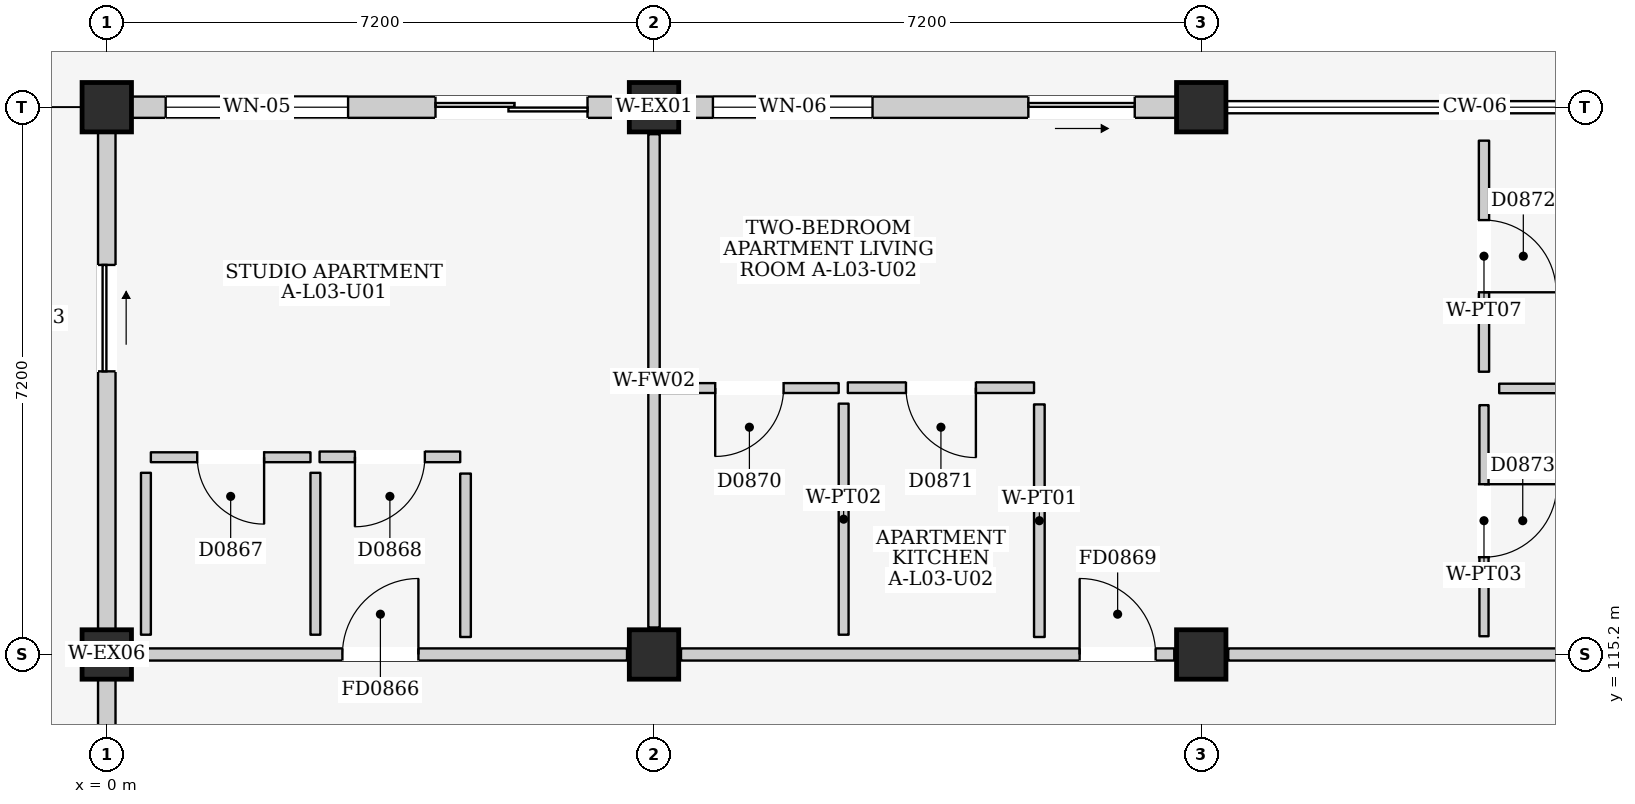
"""IFC4 building model, lengths in metres.
Left out: names, types, materials, properties, quantities, classifications, styles, units other than length and angle.
Written with IfcOpenShell. Run it as: python <this file> out.ifc"""

import sys

from ifc_helpers import new_model, si_unit, direction, frame, frame_2d, origin, origin_2d, place, context, subcontext, project, spatial, rectangle, extrude, element, fill, save


model = new_model("IFC4")
c1 = context("Model", 3, precision=1e-05, world=origin(), true_north=direction((0.0, 1.0)))
c2 = subcontext(c1, "Body", "Model", "MODEL_VIEW")
j1 = project(units=[si_unit("LENGTHUNIT", "METRE"), si_unit("PLANEANGLEUNIT", "RADIAN")], contexts=[c1])
p1 = place(None, origin())
s1 = spatial("IfcSite", under=j1, at=p1, CompositionType="ELEMENT")
p2 = place(p1, origin())
s2 = spatial("IfcBuilding", under=s1, at=p2, CompositionType="ELEMENT")
p3 = place(p2, frame((0.0, 0.0, 12.2)))
s3 = spatial("IfcBuildingStorey", under=s2, at=p3, CompositionType="ELEMENT", Elevation=12.2)
for number, where, z_axis, x_axis in (
    (1, (0.0, 115.2, 0.0), (0.0, 0.0, 1.0), (1.0, 0.0, 0.0)),
    (2, (0.0, 122.4, 0.0), (0.0, 0.0, 1.0), (1.0, 0.0, 0.0)),
    (3, (7.2, 115.2, 0.0), (0.0, 0.0, 1.0), (1.0, 0.0, 0.0)),
    (4, (7.2, 122.4, 0.0), (0.0, 0.0, 1.0), (1.0, 0.0, 0.0)),
    (5, (14.4, 115.2, 0.0), (0.0, 0.0, 1.0), (1.0, 0.0, 0.0)),
    (6, (14.4, 122.4, 0.0), (0.0, 0.0, 1.0), (1.0, 0.0, 0.0)),
):
    element("IfcColumn", number, at=place(p3, frame(where, z_axis=z_axis, x_axis=x_axis)), inside=s3, PredefinedType="COLUMN", context=c2, shape_type="SweptSolid", body=[
        extrude(rectangle(XDim=0.65, YDim=0.65, at=origin_2d()), origin(), (0.0, 0.0, 1.0), 3.2),
    ])
p4 = place(p3, frame((0.325, 122.4, 0.0), z_axis=(0.0, 0.0, 1.0), x_axis=(1.0, 0.0, 0.0)))
e7 = element("IfcWall", 7, at=p4, inside=s3, PredefinedType="ELEMENTEDWALL", context=c2, shape_type="SweptSolid", body=[
    extrude(rectangle(XDim=6.55, YDim=0.28, at=frame_2d((3.275, 0.0))), origin(), (0.0, 0.0, 1.0), 2.445),
])
p5 = place(p4, frame((4.0, 0.0, 0.0)))
e8 = element("IfcOpeningElement", 8, at=p5, cuts=e7, PredefinedType="OPENING", context=c2, shape_type="SweptSolid", body=[
    extrude(rectangle(XDim=2.0, YDim=2.12, at=frame_2d((1.0, 1.06))), frame((0.0, 0.155, 0.0), z_axis=(0.0, -1.0, 0.0), x_axis=(1.0, 0.0, 0.0)), (0.0, 0.0, 1.0), 0.31),
])
p6 = place(p4, frame((0.45, 0.0, 0.685)))
e9 = element("IfcOpeningElement", 9, at=p6, cuts=e7, PredefinedType="OPENING", context=c2, shape_type="SweptSolid", body=[
    extrude(rectangle(XDim=2.4, YDim=1.65, at=frame_2d((1.2, 0.825))), frame((0.0, 0.155, 0.0), z_axis=(0.0, -1.0, 0.0), x_axis=(1.0, 0.0, 0.0)), (0.0, 0.0, 1.0), 0.31),
])
p7 = place(p3, frame((7.525, 122.4, 0.0), z_axis=(0.0, 0.0, 1.0), x_axis=(1.0, 0.0, 0.0)))
e10 = element("IfcWall", 10, at=p7, inside=s3, PredefinedType="ELEMENTEDWALL", context=c2, shape_type="SweptSolid", body=[
    extrude(rectangle(XDim=6.55, YDim=0.28, at=frame_2d((3.275, 0.0))), origin(), (0.0, 0.0, 1.0), 2.445),
])
p8 = place(p7, frame((4.6, 0.0, 0.0)))
e11 = element("IfcOpeningElement", 11, at=p8, cuts=e10, PredefinedType="OPENING", context=c2, shape_type="SweptSolid", body=[
    extrude(rectangle(XDim=1.4, YDim=2.1, at=frame_2d((0.7, 1.05))), frame((0.0, 0.155, 0.0), z_axis=(0.0, -1.0, 0.0), x_axis=(1.0, 0.0, 0.0)), (0.0, 0.0, 1.0), 0.31),
])
p9 = place(p7, frame((0.45, 0.0, 0.685)))
e12 = element("IfcOpeningElement", 12, at=p9, cuts=e10, PredefinedType="OPENING", context=c2, shape_type="SweptSolid", body=[
    extrude(rectangle(XDim=2.1, YDim=1.65, at=frame_2d((1.05, 0.825))), frame((0.0, 0.155, 0.0), z_axis=(0.0, -1.0, 0.0), x_axis=(1.0, 0.0, 0.0)), (0.0, 0.0, 1.0), 0.31),
])
p10 = place(p3, frame((0.0, 108.325, 0.0), z_axis=(0.0, 0.0, 1.0), x_axis=(0.0, 1.0, 0.0)))
e13 = element("IfcWall", 13, at=p10, inside=s3, PredefinedType="ELEMENTEDWALL", context=c2, shape_type="SweptSolid", body=[
    extrude(rectangle(XDim=6.55, YDim=0.23, at=frame_2d((3.275, 0.0))), origin(), (0.0, 0.0, 1.0), 2.445),
])
p11 = place(p10, frame((2.75, 0.0, 1.1)))
e14 = element("IfcOpeningElement", 14, at=p11, cuts=e13, PredefinedType="OPENING", context=c2, shape_type="SweptSolid", body=[
    extrude(rectangle(XDim=1.0, YDim=0.9, at=frame_2d((0.5, 0.45))), frame((0.0, 0.13, 0.0), z_axis=(0.0, -1.0, 0.0), x_axis=(1.0, 0.0, 0.0)), (0.0, 0.0, 1.0), 0.26),
])
p12 = place(p3, frame((0.0, 115.525, 0.0), z_axis=(0.0, 0.0, 1.0), x_axis=(0.0, 1.0, 0.0)))
e15 = element("IfcWall", 15, at=p12, inside=s3, PredefinedType="ELEMENTEDWALL", context=c2, shape_type="SweptSolid", body=[
    extrude(rectangle(XDim=6.55, YDim=0.23, at=frame_2d((3.275, 0.0))), origin(), (0.0, 0.0, 1.0), 2.445),
])
p13 = place(p12, frame((3.4, 0.0, 0.0)))
e16 = element("IfcOpeningElement", 16, at=p13, cuts=e15, PredefinedType="OPENING", context=c2, shape_type="SweptSolid", body=[
    extrude(rectangle(XDim=1.4, YDim=2.1, at=frame_2d((0.7, 1.05))), frame((0.0, 0.13, 0.0), z_axis=(0.0, -1.0, 0.0), x_axis=(1.0, 0.0, 0.0)), (0.0, 0.0, 1.0), 0.26),
])
p14 = place(p3, frame((0.355, 115.2, 0.0), z_axis=(0.0, 0.0, 1.0), x_axis=(1.0, 0.0, 0.0)))
e17 = element("IfcWall", 17, at=p14, inside=s3, PredefinedType="PARTITIONING", context=c2, shape_type="SweptSolid", body=[
    extrude(rectangle(XDim=6.49, YDim=0.16, at=frame_2d((3.245, 0.0))), origin(), (0.0, 0.0, 1.0), 2.315),
])
p15 = place(p14, frame((2.745, 0.0, 0.0)))
e18 = element("IfcOpeningElement", 18, at=p15, cuts=e17, PredefinedType="OPENING", context=c2, shape_type="SweptSolid", body=[
    extrude(rectangle(XDim=1.0, YDim=2.15, at=frame_2d((0.5, 1.075))), frame((0.0, 0.095, 0.0), z_axis=(0.0, -1.0, 0.0), x_axis=(1.0, 0.0, 0.0)), (0.0, 0.0, 1.0), 0.19),
])
p16 = place(p3, frame((7.2, 115.555, 0.0), z_axis=(0.0, 0.0, 1.0), x_axis=(0.0, 1.0, 0.0)))
e19 = element("IfcWall", 19, at=p16, inside=s3, PredefinedType="PARTITIONING", context=c2, shape_type="SweptSolid", body=[
    extrude(rectangle(XDim=6.49, YDim=0.15, at=frame_2d((3.245, 0.0))), origin(), (0.0, 0.0, 1.0), 2.415),
])
p17 = place(p3, frame((0.58, 117.795, 0.0), z_axis=(0.0, 0.0, 1.0), x_axis=(1.0, 0.0, 0.0)))
e20 = element("IfcWall", 20, at=p17, inside=s3, PredefinedType="PARTITIONING", context=c2, shape_type="SweptSolid", body=[
    extrude(rectangle(XDim=2.1, YDim=0.13, at=frame_2d((1.05, 0.0))), origin(), (0.0, 0.0, 1.0), 2.98),
])
p18 = place(p17, frame((0.61, 0.0, 0.0)))
e21 = element("IfcOpeningElement", 21, at=p18, cuts=e20, PredefinedType="OPENING", context=c2, shape_type="SweptSolid", body=[
    extrude(rectangle(XDim=0.88, YDim=2.1, at=frame_2d((0.44, 1.05))), frame((0.0, 0.08, 0.0), z_axis=(0.0, -1.0, 0.0), x_axis=(1.0, 0.0, 0.0)), (0.0, 0.0, 1.0), 0.16),
])
for number, where, z_axis, x_axis in (
    (22, (2.745, 115.46, 0.0), (0.0, 0.0, 1.0), (0.0, 1.0, 0.0)),
    (23, (0.515, 115.46, 0.0), (0.0, 0.0, 1.0), (0.0, 1.0, 0.0)),
):
    element("IfcWall", number, at=place(p3, frame(where, z_axis=z_axis, x_axis=x_axis)), inside=s3, PredefinedType="PARTITIONING", context=c2, shape_type="SweptSolid", body=[
        extrude(rectangle(XDim=2.13, YDim=0.13, at=frame_2d((1.065, 0.0))), origin(), (0.0, 0.0, 1.0), 2.98),
    ])
p19 = place(p3, frame((2.8, 117.8, 0.0), z_axis=(0.0, 0.0, 1.0), x_axis=(1.0, 0.0, 0.0)))
e24 = element("IfcWall", 24, at=p19, inside=s3, PredefinedType="PARTITIONING", context=c2, shape_type="SweptSolid", body=[
    extrude(rectangle(XDim=1.85, YDim=0.14, at=frame_2d((0.925, 0.0))), origin(), (0.0, 0.0, 1.0), 2.98),
])
p20 = place(p19, frame((0.465, 0.0, 0.0)))
e25 = element("IfcOpeningElement", 25, at=p20, cuts=e24, PredefinedType="OPENING", context=c2, shape_type="SweptSolid", body=[
    extrude(rectangle(XDim=0.92, YDim=2.1, at=frame_2d((0.46, 1.05))), frame((0.0, 0.085, 0.0), z_axis=(0.0, -1.0, 0.0), x_axis=(1.0, 0.0, 0.0)), (0.0, 0.0, 1.0), 0.17),
])
p21 = place(p3, frame((4.72, 115.43, 0.0), z_axis=(0.0, 0.0, 1.0), x_axis=(0.0, 1.0, 0.0)))
e26 = element("IfcWall", 26, at=p21, inside=s3, PredefinedType="PARTITIONING", context=c2, shape_type="SweptSolid", body=[
    extrude(rectangle(XDim=2.15, YDim=0.14, at=frame_2d((1.075, 0.0))), origin(), (0.0, 0.0, 1.0), 2.98),
])
p22 = place(p3, frame((7.555, 115.2, 0.0), z_axis=(0.0, 0.0, 1.0), x_axis=(1.0, 0.0, 0.0)))
e27 = element("IfcWall", 27, at=p22, inside=s3, PredefinedType="PARTITIONING", context=c2, shape_type="SweptSolid", body=[
    extrude(rectangle(XDim=6.49, YDim=0.16, at=frame_2d((3.245, 0.0))), origin(), (0.0, 0.0, 1.0), 2.315),
])
p23 = place(p22, frame((5.245, 0.0, 0.0)))
e28 = element("IfcOpeningElement", 28, at=p23, cuts=e27, PredefinedType="OPENING", context=c2, shape_type="SweptSolid", body=[
    extrude(rectangle(XDim=1.0, YDim=2.15, at=frame_2d((0.5, 1.075))), frame((0.0, 0.095, 0.0), z_axis=(0.0, -1.0, 0.0), x_axis=(1.0, 0.0, 0.0)), (0.0, 0.0, 1.0), 0.19),
])
p24 = place(p3, frame((14.755, 115.2, 0.0), z_axis=(0.0, 0.0, 1.0), x_axis=(1.0, 0.0, 0.0)))
e29 = element("IfcWall", 29, at=p24, inside=s3, PredefinedType="PARTITIONING", context=c2, shape_type="SweptSolid", body=[
    extrude(rectangle(XDim=6.49, YDim=0.16, at=frame_2d((3.245, 0.0))), origin(), (0.0, 0.0, 1.0), 2.315),
])
p25 = place(p3, frame((7.28, 118.705, 0.0), z_axis=(0.0, 0.0, 1.0), x_axis=(1.0, 0.0, 0.0)))
e30 = element("IfcWall", 30, at=p25, inside=s3, PredefinedType="PARTITIONING", context=c2, shape_type="SweptSolid", body=[
    extrude(rectangle(XDim=2.35, YDim=0.13, at=frame_2d((1.175, 0.0))), origin(), (0.0, 0.0, 1.0), 2.98),
])
p26 = place(p25, frame((0.725, 0.0, 0.0)))
e31 = element("IfcOpeningElement", 31, at=p26, cuts=e30, PredefinedType="OPENING", context=c2, shape_type="SweptSolid", body=[
    extrude(rectangle(XDim=0.9, YDim=2.1, at=frame_2d((0.45, 1.05))), frame((0.0, 0.08, 0.0), z_axis=(0.0, -1.0, 0.0), x_axis=(1.0, 0.0, 0.0)), (0.0, 0.0, 1.0), 0.16),
])
p27 = place(p3, frame((9.695, 115.46, 0.0), z_axis=(0.0, 0.0, 1.0), x_axis=(0.0, 1.0, 0.0)))
e32 = element("IfcWall", 32, at=p27, inside=s3, PredefinedType="PARTITIONING", context=c2, shape_type="SweptSolid", body=[
    extrude(rectangle(XDim=3.04, YDim=0.13, at=frame_2d((1.52, 0.0))), origin(), (0.0, 0.0, 1.0), 2.98),
])
p28 = place(p3, frame((9.75, 118.71, 0.0), z_axis=(0.0, 0.0, 1.0), x_axis=(1.0, 0.0, 0.0)))
e33 = element("IfcWall", 33, at=p28, inside=s3, PredefinedType="PARTITIONING", context=c2, shape_type="SweptSolid", body=[
    extrude(rectangle(XDim=2.45, YDim=0.14, at=frame_2d((1.225, 0.0))), origin(), (0.0, 0.0, 1.0), 2.98),
])
p29 = place(p28, frame((0.765, 0.0, 0.0)))
e34 = element("IfcOpeningElement", 34, at=p29, cuts=e33, PredefinedType="OPENING", context=c2, shape_type="SweptSolid", body=[
    extrude(rectangle(XDim=0.92, YDim=2.1, at=frame_2d((0.46, 1.05))), frame((0.0, 0.085, 0.0), z_axis=(0.0, -1.0, 0.0), x_axis=(1.0, 0.0, 0.0)), (0.0, 0.0, 1.0), 0.17),
])
p30 = place(p3, frame((12.27, 115.43, 0.0), z_axis=(0.0, 0.0, 1.0), x_axis=(0.0, 1.0, 0.0)))
e35 = element("IfcWall", 35, at=p30, inside=s3, PredefinedType="PARTITIONING", context=c2, shape_type="SweptSolid", body=[
    extrude(rectangle(XDim=3.06, YDim=0.14, at=frame_2d((1.53, 0.0))), origin(), (0.0, 0.0, 1.0), 2.98),
])
p31 = place(p3, frame((18.12, 118.92, 0.0), z_axis=(0.0, 0.0, 1.0), x_axis=(0.0, 1.0, 0.0)))
e36 = element("IfcWall", 36, at=p31, inside=s3, PredefinedType="PARTITIONING", context=c2, shape_type="SweptSolid", body=[
    extrude(rectangle(XDim=3.04, YDim=0.135, at=frame_2d((1.52, 0.0))), origin(), (0.0, 0.0, 1.0), 2.98),
])
p32 = place(p31, frame((1.045, 0.0, 0.0)))
e37 = element("IfcOpeningElement", 37, at=p32, cuts=e36, PredefinedType="OPENING", context=c2, shape_type="SweptSolid", body=[
    extrude(rectangle(XDim=0.95, YDim=2.15, at=frame_2d((0.475, 1.075))), frame((0.0, 0.083, 0.0), z_axis=(0.0, -1.0, 0.0), x_axis=(1.0, 0.0, 0.0)), (0.0, 0.0, 1.0), 0.165),
])
p33 = place(p3, frame((18.32, 118.7, 0.0), z_axis=(0.0, 0.0, 1.0), x_axis=(1.0, 0.0, 0.0)))
e38 = element("IfcWall", 38, at=p33, inside=s3, PredefinedType="PARTITIONING", context=c2, shape_type="SweptSolid", body=[
    extrude(rectangle(XDim=3.06, YDim=0.125, at=frame_2d((1.53, 0.0))), origin(), (0.0, 0.0, 1.0), 2.98),
])
p34 = place(p3, frame((18.12, 115.44, 0.0), z_axis=(0.0, 0.0, 1.0), x_axis=(0.0, 1.0, 0.0)))
e39 = element("IfcWall", 39, at=p34, inside=s3, PredefinedType="PARTITIONING", context=c2, shape_type="SweptSolid", body=[
    extrude(rectangle(XDim=3.04, YDim=0.12, at=frame_2d((1.52, 0.0))), origin(), (0.0, 0.0, 1.0), 2.98),
])
p35 = place(p34, frame((1.04, 0.0, 0.0)))
e40 = element("IfcOpeningElement", 40, at=p35, cuts=e39, PredefinedType="OPENING", context=c2, shape_type="SweptSolid", body=[
    extrude(rectangle(XDim=0.96, YDim=2.15, at=frame_2d((0.48, 1.075))), frame((0.0, 0.075, 0.0), z_axis=(0.0, -1.0, 0.0), x_axis=(1.0, 0.0, 0.0)), (0.0, 0.0, 1.0), 0.15),
])
p36 = place(p5, frame((2.0, 0.0, 0.0), z_axis=(0.0, 0.0, 1.0), x_axis=(-1.0, 0.0, 0.0)))
e41 = element("IfcDoor", 41, at=p36, inside=s3, OperationType="DOUBLE_DOOR_SLIDING", PredefinedType="DOOR", context=c2, shape_type="SweptSolid", body=[
    extrude(rectangle(XDim=2.0, YDim=2.12, at=frame_2d((1.0, 1.06))), frame((0.0, 0.025, 0.0), z_axis=(0.0, -1.0, 0.0), x_axis=(1.0, 0.0, 0.0)), (0.0, 0.0, 1.0), 0.05),
])
fill(e8, e41)
p37 = place(p6, origin())
e42 = element("IfcWindow", 42, at=p37, inside=s3, PartitioningType="TRIPLE_PANEL_VERTICAL", PredefinedType="WINDOW", context=c2, shape_type="SweptSolid", body=[
    extrude(rectangle(XDim=2.4, YDim=1.65, at=frame_2d((1.2, 0.825))), frame((0.0, 0.03, 0.0), z_axis=(0.0, -1.0, 0.0), x_axis=(1.0, 0.0, 0.0)), (0.0, 0.0, 1.0), 0.06),
])
fill(e9, e42)
p38 = place(p8, frame((1.4, 0.0, 0.0), z_axis=(0.0, 0.0, 1.0), x_axis=(-1.0, 0.0, 0.0)))
e43 = element("IfcDoor", 43, at=p38, inside=s3, OperationType="SLIDING_TO_RIGHT", PredefinedType="DOOR", context=c2, shape_type="SweptSolid", body=[
    extrude(rectangle(XDim=1.4, YDim=2.1, at=frame_2d((0.7, 1.05))), frame((0.0, 0.025, 0.0), z_axis=(0.0, -1.0, 0.0), x_axis=(1.0, 0.0, 0.0)), (0.0, 0.0, 1.0), 0.05),
])
fill(e11, e43)
p39 = place(p9, origin())
e44 = element("IfcWindow", 44, at=p39, inside=s3, PartitioningType="DOUBLE_PANEL_VERTICAL", PredefinedType="WINDOW", context=c2, shape_type="SweptSolid", body=[
    extrude(rectangle(XDim=2.1, YDim=1.65, at=frame_2d((1.05, 0.825))), frame((0.0, 0.03, 0.0), z_axis=(0.0, -1.0, 0.0), x_axis=(1.0, 0.0, 0.0)), (0.0, 0.0, 1.0), 0.06),
])
fill(e12, e44)
p40 = place(p13, frame((1.4, 0.0, 0.0), z_axis=(0.0, 0.0, 1.0), x_axis=(-1.0, 0.0, 0.0)))
e45 = element("IfcDoor", 45, at=p40, inside=s3, OperationType="SLIDING_TO_RIGHT", PredefinedType="DOOR", context=c2, shape_type="SweptSolid", body=[
    extrude(rectangle(XDim=1.4, YDim=2.1, at=frame_2d((0.7, 1.05))), frame((0.0, 0.025, 0.0), z_axis=(0.0, -1.0, 0.0), x_axis=(1.0, 0.0, 0.0)), (0.0, 0.0, 1.0), 0.05),
])
fill(e16, e45)
p41 = place(p15, origin())
e46 = element("IfcDoor", 46, at=p41, inside=s3, OperationType="SINGLE_SWING_RIGHT", PredefinedType="DOOR", context=c2, shape_type="SweptSolid", body=[
    extrude(rectangle(XDim=1.0, YDim=2.15, at=frame_2d((0.5, 1.075))), frame((0.0, 0.025, 0.0), z_axis=(0.0, -1.0, 0.0), x_axis=(1.0, 0.0, 0.0)), (0.0, 0.0, 1.0), 0.05),
])
fill(e18, e46)
p42 = place(p18, frame((0.88, 0.0, 0.0), z_axis=(0.0, 0.0, 1.0), x_axis=(-1.0, 0.0, 0.0)))
e47 = element("IfcDoor", 47, at=p42, inside=s3, OperationType="SINGLE_SWING_LEFT", PredefinedType="DOOR", context=c2, shape_type="SweptSolid", body=[
    extrude(rectangle(XDim=0.88, YDim=2.1, at=frame_2d((0.44, 1.05))), frame((0.0, 0.025, 0.0), z_axis=(0.0, -1.0, 0.0), x_axis=(1.0, 0.0, 0.0)), (0.0, 0.0, 1.0), 0.05),
])
fill(e21, e47)
p43 = place(p20, frame((0.92, 0.0, 0.0), z_axis=(0.0, 0.0, 1.0), x_axis=(-1.0, 0.0, 0.0)))
e48 = element("IfcDoor", 48, at=p43, inside=s3, OperationType="SINGLE_SWING_RIGHT", PredefinedType="DOOR", context=c2, shape_type="SweptSolid", body=[
    extrude(rectangle(XDim=0.92, YDim=2.1, at=frame_2d((0.46, 1.05))), frame((0.0, 0.025, 0.0), z_axis=(0.0, -1.0, 0.0), x_axis=(1.0, 0.0, 0.0)), (0.0, 0.0, 1.0), 0.05),
])
fill(e25, e48)
p44 = place(p23, origin())
e49 = element("IfcDoor", 49, at=p44, inside=s3, OperationType="SINGLE_SWING_LEFT", PredefinedType="DOOR", context=c2, shape_type="SweptSolid", body=[
    extrude(rectangle(XDim=1.0, YDim=2.15, at=frame_2d((0.5, 1.075))), frame((0.0, 0.025, 0.0), z_axis=(0.0, -1.0, 0.0), x_axis=(1.0, 0.0, 0.0)), (0.0, 0.0, 1.0), 0.05),
])
fill(e28, e49)
p45 = place(p26, frame((0.9, 0.0, 0.0), z_axis=(0.0, 0.0, 1.0), x_axis=(-1.0, 0.0, 0.0)))
e50 = element("IfcDoor", 50, at=p45, inside=s3, OperationType="SINGLE_SWING_RIGHT", PredefinedType="DOOR", context=c2, shape_type="SweptSolid", body=[
    extrude(rectangle(XDim=0.9, YDim=2.1, at=frame_2d((0.45, 1.05))), frame((0.0, 0.025, 0.0), z_axis=(0.0, -1.0, 0.0), x_axis=(1.0, 0.0, 0.0)), (0.0, 0.0, 1.0), 0.05),
])
fill(e31, e50)
p46 = place(p29, frame((0.92, 0.0, 0.0), z_axis=(0.0, 0.0, 1.0), x_axis=(-1.0, 0.0, 0.0)))
e51 = element("IfcDoor", 51, at=p46, inside=s3, OperationType="SINGLE_SWING_LEFT", PredefinedType="DOOR", context=c2, shape_type="SweptSolid", body=[
    extrude(rectangle(XDim=0.92, YDim=2.1, at=frame_2d((0.46, 1.05))), frame((0.0, 0.025, 0.0), z_axis=(0.0, -1.0, 0.0), x_axis=(1.0, 0.0, 0.0)), (0.0, 0.0, 1.0), 0.05),
])
fill(e34, e51)
p47 = place(p32, frame((0.95, 0.0, 0.0), z_axis=(0.0, 0.0, 1.0), x_axis=(-1.0, 0.0, 0.0)))
e52 = element("IfcDoor", 52, at=p47, inside=s3, OperationType="SINGLE_SWING_RIGHT", PredefinedType="DOOR", context=c2, shape_type="SweptSolid", body=[
    extrude(rectangle(XDim=0.95, YDim=2.15, at=frame_2d((0.475, 1.075))), frame((0.0, 0.025, 0.0), z_axis=(0.0, -1.0, 0.0), x_axis=(1.0, 0.0, 0.0)), (0.0, 0.0, 1.0), 0.05),
])
fill(e37, e52)
p48 = place(p35, frame((0.96, 0.0, 0.0), z_axis=(0.0, 0.0, 1.0), x_axis=(-1.0, 0.0, 0.0)))
e53 = element("IfcDoor", 53, at=p48, inside=s3, OperationType="SINGLE_SWING_LEFT", PredefinedType="DOOR", context=c2, shape_type="SweptSolid", body=[
    extrude(rectangle(XDim=0.96, YDim=2.15, at=frame_2d((0.48, 1.075))), frame((0.0, 0.025, 0.0), z_axis=(0.0, -1.0, 0.0), x_axis=(1.0, 0.0, 0.0)), (0.0, 0.0, 1.0), 0.05),
])
fill(e40, e53)
save(model, sys.argv[1])
